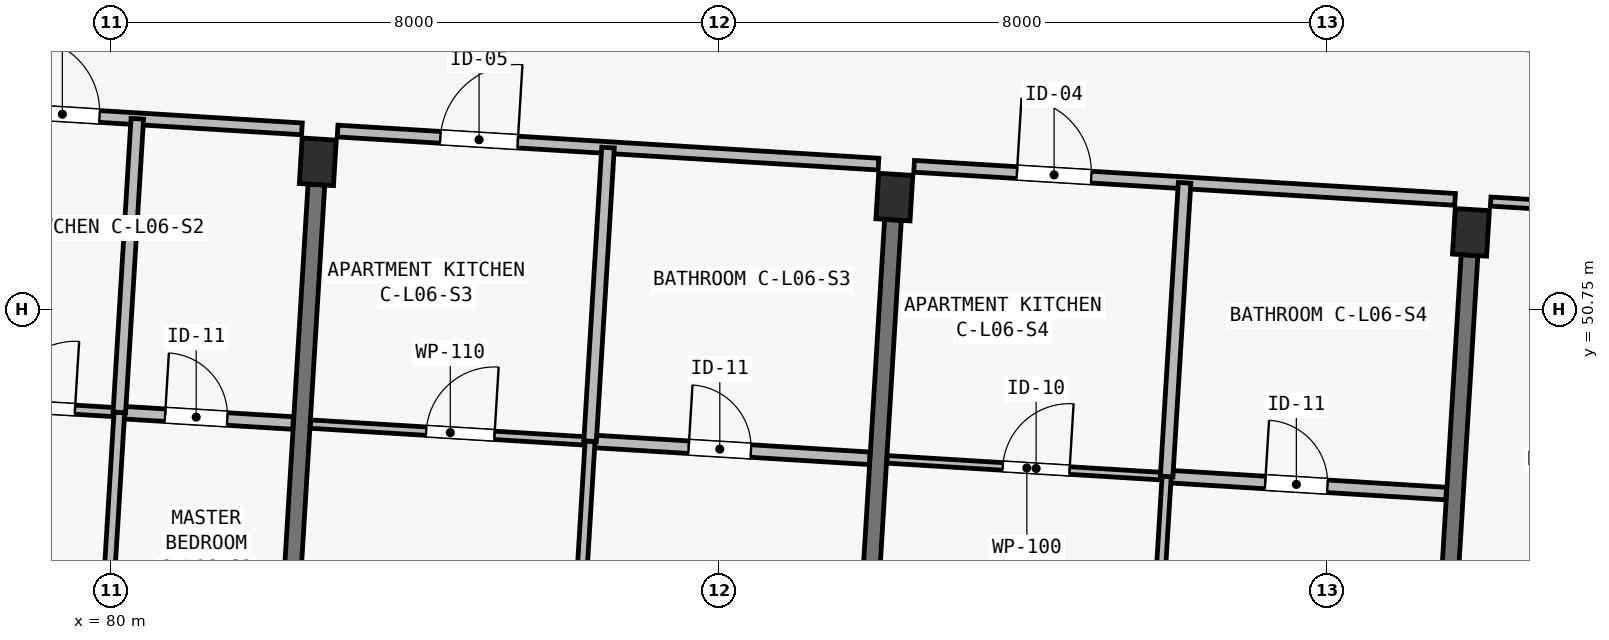
"""IFC4 building model, lengths in metres.
Left out: names, types, materials, properties, quantities, classifications, styles, units other than length and angle.
Written with IfcOpenShell. Run it as: python <this file> out.ifc"""

import sys

from ifc_helpers import new_model, si_unit, direction, frame, frame_2d, origin, origin_2d, place, context, subcontext, project, spatial, rectangle, extrude, element, fill, save


model = new_model("IFC4")
c1 = context("Model", 3, precision=1e-05, world=origin(), true_north=direction((0.0, 1.0)))
c2 = subcontext(c1, "Body", "Model", "MODEL_VIEW")
j1 = project(units=[si_unit("LENGTHUNIT", "METRE"), si_unit("PLANEANGLEUNIT", "RADIAN")], contexts=[c1])
p1 = place(None, origin())
s1 = spatial("IfcSite", under=j1, at=p1, CompositionType="ELEMENT")
p2 = place(p1, origin())
s2 = spatial("IfcBuilding", under=s1, at=p2, CompositionType="ELEMENT")
p3 = place(p2, frame((0.0, 0.0, 21.4)))
s3 = spatial("IfcBuildingStorey", under=s2, at=p3, CompositionType="ELEMENT", Elevation=21.4)
for number, where, z_axis, x_axis in (
    (1, (82.721, 52.694, 0.0), (0.0, 0.0, 1.0), (0.998, -0.061, 0.0)),
    (2, (90.307, 52.23, 0.0), (0.0, 0.0, 1.0), (0.998, -0.061, 0.0)),
    (3, (97.893, 51.766, 0.0), (0.0, 0.0, 1.0), (0.998, -0.061, 0.0)),
):
    element("IfcColumn", number, at=place(p3, frame(where, z_axis=z_axis, x_axis=x_axis)), inside=s3, PredefinedType="COLUMN", context=c2, shape_type="SweptSolid", body=[
        extrude(rectangle(XDim=0.45, YDim=0.6, at=origin_2d()), origin(), (0.0, 0.0, 1.0), 3.25),
    ])
for number, where, z_axis, x_axis in (
    (4, (82.276, 45.407, 0.0), (0.0, 0.0, 1.0), (0.061, 0.998, 0.0)),
    (5, (89.862, 44.944, 0.0), (0.0, 0.0, 1.0), (0.061, 0.998, 0.0)),
    (6, (97.448, 44.479, 0.0), (0.0, 0.0, 1.0), (0.061, 0.998, 0.0)),
):
    element("IfcWall", number, at=place(p3, frame(where, z_axis=z_axis, x_axis=x_axis)), inside=s3, PredefinedType="SHEAR", context=c2, shape_type="SweptSolid", body=[
        extrude(rectangle(XDim=7.0, YDim=0.22, at=frame_2d((3.5, 0.0))), origin(), (0.0, 0.0, 1.0), 2.5),
    ])
p4 = place(p3, frame((78.415, 53.378, 0.0), z_axis=(0.0, 0.0, 1.0), x_axis=(0.998132736029, -0.061082250024, 0.0)))
e7 = element("IfcWall", 7, at=p4, inside=s3, PredefinedType="PARTITIONING", context=c2, shape_type="SweptSolid", body=[
    extrude(rectangle(XDim=4.105, YDim=0.155, at=frame_2d((2.052, 0.0))), origin(), (0.0, 0.0, 1.0), 2.97),
])
p5 = place(p4, frame((0.457, 0.0, 0.0)))
e8 = element("IfcOpeningElement", 8, at=p5, cuts=e7, PredefinedType="OPENING", context=c2, shape_type="SweptSolid", body=[
    extrude(rectangle(XDim=0.98, YDim=2.15, at=frame_2d((0.49, 1.075))), frame((0.0, 0.093, 0.0), z_axis=(0.0, -1.0, 0.0), x_axis=(1.0, 0.0, 0.0)), (0.0, 0.0, 1.0), 0.185),
])
p6 = place(p3, frame((75.04, 49.707, 0.0), z_axis=(0.0, 0.0, 1.0), x_axis=(0.998135637207, -0.061034823981, 0.0)))
e9 = element("IfcWall", 9, at=p6, inside=s3, PredefinedType="PARTITIONING", context=c2, shape_type="SweptSolid", body=[
    extrude(rectangle(XDim=5.08, YDim=0.12, at=frame_2d((2.54, 0.0))), origin(), (0.0, 0.0, 1.0), 2.97),
])
p7 = place(p6, frame((3.595, 0.0, 0.0)))
e10 = element("IfcOpeningElement", 10, at=p7, cuts=e9, PredefinedType="OPENING", context=c2, shape_type="SweptSolid", body=[
    extrude(rectangle(XDim=0.9, YDim=2.1, at=frame_2d((0.45, 1.05))), frame((0.0, 0.075, 0.0), z_axis=(0.0, -1.0, 0.0), x_axis=(1.0, 0.0, 0.0)), (0.0, 0.0, 1.0), 0.15),
])
p8 = place(p3, frame((80.11, 49.397, 0.0), z_axis=(0.0, 0.0, 1.0), x_axis=(0.99813222782, -0.061090553999, 0.0)))
e11 = element("IfcWall", 11, at=p8, inside=s3, PredefinedType="PLUMBINGWALL", context=c2, shape_type="SweptSolid", body=[
    extrude(rectangle(XDim=2.29, YDim=0.165, at=frame_2d((1.145, 0.0))), origin(), (0.0, 0.0, 1.0), 2.97),
])
p9 = place(p8, frame((0.603, 0.0, 0.0)))
e12 = element("IfcOpeningElement", 12, at=p9, cuts=e11, PredefinedType="OPENING", context=c2, shape_type="SweptSolid", body=[
    extrude(rectangle(XDim=0.82, YDim=2.08, at=frame_2d((0.41, 1.04))), frame((0.0, 0.097, 0.0), z_axis=(0.0, -1.0, 0.0), x_axis=(1.0, 0.0, 0.0)), (0.0, 0.0, 1.0), 0.195),
])
p10 = place(p3, frame((79.833, 44.866, 0.0), z_axis=(0.0, 0.0, 1.0), x_axis=(0.061035713941, 0.998135582786, 0.0)))
e13 = element("IfcWall", 13, at=p10, inside=s3, PredefinedType="PARTITIONING", context=c2, shape_type="SweptSolid", body=[
    extrude(rectangle(XDim=4.54, YDim=0.14, at=frame_2d((2.27, 0.0))), origin(), (0.0, 0.0, 1.0), 2.97),
])
p11 = place(p10, frame((1.35, 0.0, 0.0)))
e14 = element("IfcOpeningElement", 14, at=p11, cuts=e13, PredefinedType="OPENING", context=c2, shape_type="SweptSolid", body=[
    extrude(rectangle(XDim=0.9, YDim=2.1, at=frame_2d((0.45, 1.05))), frame((0.0, 0.085, 0.0), z_axis=(0.0, -1.0, 0.0), x_axis=(1.0, 0.0, 0.0)), (0.0, 0.0, 1.0), 0.17),
])
p12 = place(p3, frame((80.11, 49.397, 0.0), z_axis=(0.0, 0.0, 1.0), x_axis=(0.061066453301, 0.998133702608, 0.0)))
e15 = element("IfcWall", 15, at=p12, inside=s3, PredefinedType="PLUMBINGWALL", context=c2, shape_type="SweptSolid", body=[
    extrude(rectangle(XDim=3.87, YDim=0.165, at=frame_2d((1.935, 0.0))), origin(), (0.0, 0.0, 1.0), 2.97),
])
p13 = place(p3, frame((82.982, 53.099, 0.0), z_axis=(0.0, 0.0, 1.0), x_axis=(0.998134569689, -0.061052279168, 0.0)))
e16 = element("IfcWall", 16, at=p13, inside=s3, PredefinedType="PARTITIONING", context=c2, shape_type="SweptSolid", body=[
    extrude(rectangle(XDim=7.13, YDim=0.155, at=frame_2d((3.565, 0.0))), origin(), (0.0, 0.0, 1.0), 2.97),
])
p14 = place(p13, frame((1.355, 0.0, 0.0)))
e17 = element("IfcOpeningElement", 17, at=p14, cuts=e16, PredefinedType="OPENING", context=c2, shape_type="SweptSolid", body=[
    extrude(rectangle(XDim=1.02, YDim=2.2, at=frame_2d((0.51, 1.1))), frame((0.0, 0.093, 0.0), z_axis=(0.0, -1.0, 0.0), x_axis=(1.0, 0.0, 0.0)), (0.0, 0.0, 1.0), 0.185),
])
p15 = place(p3, frame((82.625, 49.243, 0.0), z_axis=(0.0, 0.0, 1.0), x_axis=(0.998132682596, -0.061083123148, 0.0)))
e18 = element("IfcWall", 18, at=p15, inside=s3, PredefinedType="PARTITIONING", context=c2, shape_type="SweptSolid", body=[
    extrude(rectangle(XDim=3.685, YDim=0.11, at=frame_2d((1.843, 0.0))), origin(), (0.0, 0.0, 1.0), 2.97),
])
p16 = place(p15, frame((1.525, 0.0, 0.0)))
e19 = element("IfcOpeningElement", 19, at=p16, cuts=e18, PredefinedType="OPENING", context=c2, shape_type="SweptSolid", body=[
    extrude(rectangle(XDim=0.9, YDim=2.1, at=frame_2d((0.45, 1.05))), frame((0.0, 0.07, 0.0), z_axis=(0.0, -1.0, 0.0), x_axis=(1.0, 0.0, 0.0)), (0.0, 0.0, 1.0), 0.14),
])
p17 = place(p3, frame((86.304, 49.018, 0.0), z_axis=(0.0, 0.0, 1.0), x_axis=(0.998136719672, -0.061017119263, 0.0)))
e20 = element("IfcWall", 20, at=p17, inside=s3, PredefinedType="PLUMBINGWALL", context=c2, shape_type="SweptSolid", body=[
    extrude(rectangle(XDim=3.685, YDim=0.165, at=frame_2d((1.843, 0.0))), origin(), (0.0, 0.0, 1.0), 2.97),
])
p18 = place(p17, frame((1.3, 0.0, 0.0)))
e21 = element("IfcOpeningElement", 21, at=p18, cuts=e20, PredefinedType="OPENING", context=c2, shape_type="SweptSolid", body=[
    extrude(rectangle(XDim=0.82, YDim=2.08, at=frame_2d((0.41, 1.04))), frame((0.0, 0.097, 0.0), z_axis=(0.0, -1.0, 0.0), x_axis=(1.0, 0.0, 0.0)), (0.0, 0.0, 1.0), 0.195),
])
p19 = place(p3, frame((86.027, 44.487, 0.0), z_axis=(0.0, 0.0, 1.0), x_axis=(0.061035713941, 0.998135582786, 0.0)))
e22 = element("IfcWall", 22, at=p19, inside=s3, PredefinedType="PARTITIONING", context=c2, shape_type="SweptSolid", body=[
    extrude(rectangle(XDim=4.54, YDim=0.13, at=frame_2d((2.27, 0.0))), origin(), (0.0, 0.0, 1.0), 2.97),
])
p20 = place(p19, frame((1.35, 0.0, 0.0)))
e23 = element("IfcOpeningElement", 23, at=p20, cuts=e22, PredefinedType="OPENING", context=c2, shape_type="SweptSolid", body=[
    extrude(rectangle(XDim=0.88, YDim=2.1, at=frame_2d((0.44, 1.05))), frame((0.0, 0.08, 0.0), z_axis=(0.0, -1.0, 0.0), x_axis=(1.0, 0.0, 0.0)), (0.0, 0.0, 1.0), 0.16),
])
p21 = place(p3, frame((86.304, 49.018, 0.0), z_axis=(0.0, 0.0, 1.0), x_axis=(0.061066453301, 0.998133702608, 0.0)))
e24 = element("IfcWall", 24, at=p21, inside=s3, PredefinedType="PLUMBINGWALL", context=c2, shape_type="SweptSolid", body=[
    extrude(rectangle(XDim=3.87, YDim=0.165, at=frame_2d((1.935, 0.0))), origin(), (0.0, 0.0, 1.0), 2.97),
])
p22 = place(p3, frame((90.567, 52.635, 0.0), z_axis=(0.0, 0.0, 1.0), x_axis=(0.998134569689, -0.061052279168, 0.0)))
e25 = element("IfcWall", 25, at=p22, inside=s3, PredefinedType="PARTITIONING", context=c2, shape_type="SweptSolid", body=[
    extrude(rectangle(XDim=7.13, YDim=0.155, at=frame_2d((3.565, 0.0))), origin(), (0.0, 0.0, 1.0), 2.97),
])
p23 = place(p22, frame((1.355, 0.0, 0.0)))
e26 = element("IfcOpeningElement", 26, at=p23, cuts=e25, PredefinedType="OPENING", context=c2, shape_type="SweptSolid", body=[
    extrude(rectangle(XDim=0.98, YDim=2.15, at=frame_2d((0.49, 1.075))), frame((0.0, 0.093, 0.0), z_axis=(0.0, -1.0, 0.0), x_axis=(1.0, 0.0, 0.0)), (0.0, 0.0, 1.0), 0.185),
])
p24 = place(p3, frame((90.211, 48.779, 0.0), z_axis=(0.0, 0.0, 1.0), x_axis=(0.998136719672, -0.061017119263, 0.0)))
e27 = element("IfcWall", 27, at=p24, inside=s3, PredefinedType="PARTITIONING", context=c2, shape_type="SweptSolid", body=[
    extrude(rectangle(XDim=3.685, YDim=0.1, at=frame_2d((1.843, 0.0))), origin(), (0.0, 0.0, 1.0), 2.97),
])
p25 = place(p24, frame((1.525, 0.0, 0.0)))
e28 = element("IfcOpeningElement", 28, at=p25, cuts=e27, PredefinedType="OPENING", context=c2, shape_type="SweptSolid", body=[
    extrude(rectangle(XDim=0.88, YDim=2.1, at=frame_2d((0.44, 1.05))), frame((0.0, 0.065, 0.0), z_axis=(0.0, -1.0, 0.0), x_axis=(1.0, 0.0, 0.0)), (0.0, 0.0, 1.0), 0.13),
])
p26 = place(p3, frame((93.89, 48.554, 0.0), z_axis=(0.0, 0.0, 1.0), x_axis=(0.99813243538, -0.061087162657, 0.0)))
e29 = element("IfcWall", 29, at=p26, inside=s3, PredefinedType="PLUMBINGWALL", context=c2, shape_type="SweptSolid", body=[
    extrude(rectangle(XDim=3.685, YDim=0.165, at=frame_2d((1.842, 0.0))), origin(), (0.0, 0.0, 1.0), 2.97),
])
p27 = place(p26, frame((1.3, 0.0, 0.0)))
e30 = element("IfcOpeningElement", 30, at=p27, cuts=e29, PredefinedType="OPENING", context=c2, shape_type="SweptSolid", body=[
    extrude(rectangle(XDim=0.82, YDim=2.08, at=frame_2d((0.41, 1.04))), frame((0.0, 0.097, 0.0), z_axis=(0.0, -1.0, 0.0), x_axis=(1.0, 0.0, 0.0)), (0.0, 0.0, 1.0), 0.195),
])
p28 = place(p3, frame((93.612, 44.023, 0.0), z_axis=(0.0, 0.0, 1.0), x_axis=(0.061089289302, 0.998132305224, 0.0)))
e31 = element("IfcWall", 31, at=p28, inside=s3, PredefinedType="PARTITIONING", context=c2, shape_type="SweptSolid", body=[
    extrude(rectangle(XDim=4.54, YDim=0.12, at=frame_2d((2.27, 0.0))), origin(), (0.0, 0.0, 1.0), 2.97),
])
p29 = place(p28, frame((1.35, 0.0, 0.0)))
e32 = element("IfcOpeningElement", 32, at=p29, cuts=e31, PredefinedType="OPENING", context=c2, shape_type="SweptSolid", body=[
    extrude(rectangle(XDim=0.9, YDim=2.1, at=frame_2d((0.45, 1.05))), frame((0.0, 0.075, 0.0), z_axis=(0.0, -1.0, 0.0), x_axis=(1.0, 0.0, 0.0)), (0.0, 0.0, 1.0), 0.15),
])
p30 = place(p3, frame((93.89, 48.554, 0.0), z_axis=(0.0, 0.0, 1.0), x_axis=(0.06100360301, 0.998137545842, 0.0)))
e33 = element("IfcWall", 33, at=p30, inside=s3, PredefinedType="PLUMBINGWALL", context=c2, shape_type="SweptSolid", body=[
    extrude(rectangle(XDim=3.87, YDim=0.165, at=frame_2d((1.935, 0.0))), origin(), (0.0, 0.0, 1.0), 2.97),
])
p31 = place(p3, frame((98.153, 52.171, 0.0), z_axis=(0.0, 0.0, 1.0), x_axis=(0.998133238441, -0.06107403965, 0.0)))
e34 = element("IfcWall", 34, at=p31, inside=s3, PredefinedType="PARTITIONING", context=c2, shape_type="SweptSolid", body=[
    extrude(rectangle(XDim=4.685, YDim=0.12, at=frame_2d((2.343, 0.0))), origin(), (0.0, 0.0, 1.0), 2.97),
])
p32 = place(p31, frame((1.15, 0.0, 0.0)))
e35 = element("IfcOpeningElement", 35, at=p32, cuts=e34, PredefinedType="OPENING", context=c2, shape_type="SweptSolid", body=[
    extrude(rectangle(XDim=1.15, YDim=2.15, at=frame_2d((0.575, 1.075))), frame((0.0, 0.075, 0.0), z_axis=(0.0, -1.0, 0.0), x_axis=(1.0, 0.0, 0.0)), (0.0, 0.0, 1.0), 0.15),
])
p33 = place(p3, frame((98.436, 54.258, 0.0), z_axis=(0.0, 0.0, 1.0), x_axis=(0.998133350094, -0.061072214879, 0.0)))
e36 = element("IfcWall", 36, at=p33, inside=s3, PredefinedType="PARTITIONING", context=c2, shape_type="SweptSolid", body=[
    extrude(rectangle(XDim=6.82, YDim=0.155, at=frame_2d((3.41, 0.0))), origin(), (0.0, 0.0, 1.0), 2.97),
])
p34 = place(p33, frame((1.205, 0.0, 0.0)))
e37 = element("IfcOpeningElement", 37, at=p34, cuts=e36, PredefinedType="OPENING", context=c2, shape_type="SweptSolid", body=[
    extrude(rectangle(XDim=1.02, YDim=2.2, at=frame_2d((0.51, 1.1))), frame((0.0, 0.093, 0.0), z_axis=(0.0, -1.0, 0.0), x_axis=(1.0, 0.0, 0.0)), (0.0, 0.0, 1.0), 0.185),
])
p35 = place(p5, origin())
e38 = element("IfcDoor", 38, at=p35, inside=s3, OperationType="SINGLE_SWING_LEFT", PredefinedType="DOOR", context=c2, shape_type="SweptSolid", body=[
    extrude(rectangle(XDim=0.98, YDim=2.15, at=frame_2d((0.49, 1.075))), frame((0.0, 0.025, 0.0), z_axis=(0.0, -1.0, 0.0), x_axis=(1.0, 0.0, 0.0)), (0.0, 0.0, 1.0), 0.05),
])
fill(e8, e38)
p36 = place(p7, origin())
e39 = element("IfcDoor", 39, at=p36, inside=s3, OperationType="SINGLE_SWING_RIGHT", PredefinedType="DOOR", context=c2, shape_type="SweptSolid", body=[
    extrude(rectangle(XDim=0.9, YDim=2.1, at=frame_2d((0.45, 1.05))), frame((0.0, 0.025, 0.0), z_axis=(0.0, -1.0, 0.0), x_axis=(1.0, 0.0, 0.0)), (0.0, 0.0, 1.0), 0.05),
])
fill(e10, e39)
p37 = place(p9, origin())
e40 = element("IfcDoor", 40, at=p37, inside=s3, OperationType="SINGLE_SWING_LEFT", PredefinedType="DOOR", context=c2, shape_type="SweptSolid", body=[
    extrude(rectangle(XDim=0.82, YDim=2.08, at=frame_2d((0.41, 1.04))), frame((0.0, 0.025, 0.0), z_axis=(0.0, -1.0, 0.0), x_axis=(1.0, 0.0, 0.0)), (0.0, 0.0, 1.0), 0.05),
])
fill(e12, e40)
p38 = place(p14, origin())
e41 = element("IfcDoor", 41, at=p38, inside=s3, OperationType="SINGLE_SWING_RIGHT", PredefinedType="DOOR", context=c2, shape_type="SweptSolid", body=[
    extrude(rectangle(XDim=1.02, YDim=2.2, at=frame_2d((0.51, 1.1))), frame((0.0, 0.025, 0.0), z_axis=(0.0, -1.0, 0.0), x_axis=(1.0, 0.0, 0.0)), (0.0, 0.0, 1.0), 0.05),
])
fill(e17, e41)
p39 = place(p16, origin())
e42 = element("IfcDoor", 42, at=p39, inside=s3, OperationType="SINGLE_SWING_RIGHT", PredefinedType="DOOR", context=c2, shape_type="SweptSolid", body=[
    extrude(rectangle(XDim=0.9, YDim=2.1, at=frame_2d((0.45, 1.05))), frame((0.0, 0.025, 0.0), z_axis=(0.0, -1.0, 0.0), x_axis=(1.0, 0.0, 0.0)), (0.0, 0.0, 1.0), 0.05),
])
fill(e19, e42)
p40 = place(p18, origin())
e43 = element("IfcDoor", 43, at=p40, inside=s3, OperationType="SINGLE_SWING_LEFT", PredefinedType="DOOR", context=c2, shape_type="SweptSolid", body=[
    extrude(rectangle(XDim=0.82, YDim=2.08, at=frame_2d((0.41, 1.04))), frame((0.0, 0.025, 0.0), z_axis=(0.0, -1.0, 0.0), x_axis=(1.0, 0.0, 0.0)), (0.0, 0.0, 1.0), 0.05),
])
fill(e21, e43)
p41 = place(p23, origin())
e44 = element("IfcDoor", 44, at=p41, inside=s3, OperationType="SINGLE_SWING_LEFT", PredefinedType="DOOR", context=c2, shape_type="SweptSolid", body=[
    extrude(rectangle(XDim=0.98, YDim=2.15, at=frame_2d((0.49, 1.075))), frame((0.0, 0.025, 0.0), z_axis=(0.0, -1.0, 0.0), x_axis=(1.0, 0.0, 0.0)), (0.0, 0.0, 1.0), 0.05),
])
fill(e26, e44)
p42 = place(p25, origin())
e45 = element("IfcDoor", 45, at=p42, inside=s3, OperationType="SINGLE_SWING_RIGHT", PredefinedType="DOOR", context=c2, shape_type="SweptSolid", body=[
    extrude(rectangle(XDim=0.88, YDim=2.1, at=frame_2d((0.44, 1.05))), frame((0.0, 0.025, 0.0), z_axis=(0.0, -1.0, 0.0), x_axis=(1.0, 0.0, 0.0)), (0.0, 0.0, 1.0), 0.05),
])
fill(e28, e45)
p43 = place(p27, origin())
e46 = element("IfcDoor", 46, at=p43, inside=s3, OperationType="SINGLE_SWING_LEFT", PredefinedType="DOOR", context=c2, shape_type="SweptSolid", body=[
    extrude(rectangle(XDim=0.82, YDim=2.08, at=frame_2d((0.41, 1.04))), frame((0.0, 0.025, 0.0), z_axis=(0.0, -1.0, 0.0), x_axis=(1.0, 0.0, 0.0)), (0.0, 0.0, 1.0), 0.05),
])
fill(e30, e46)
save(model, sys.argv[1])
